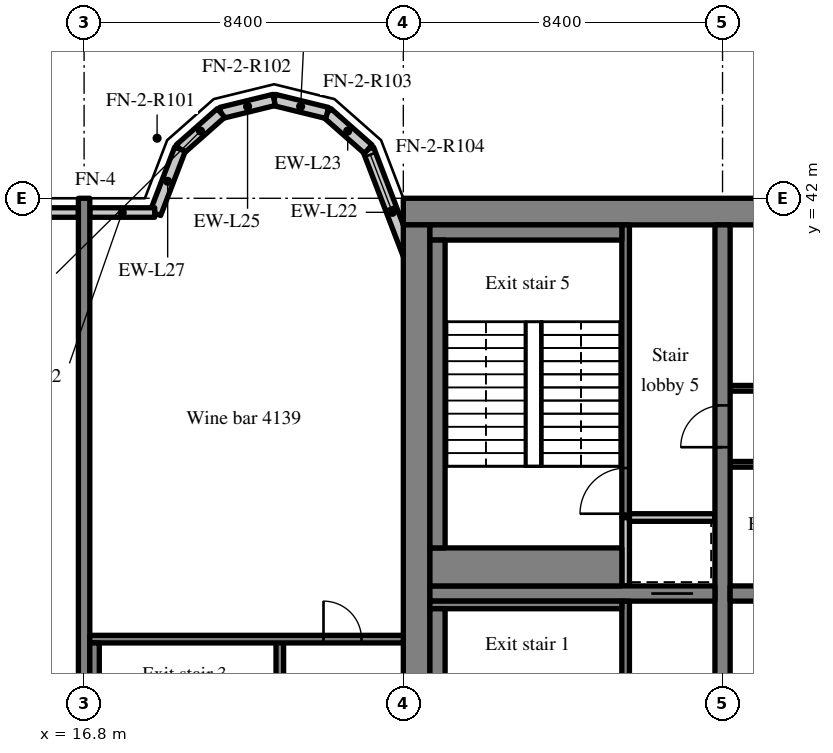
"""IFC4 building model, lengths in metres.
Left out: names, types, materials, properties, quantities, classifications, styles, units other than length and angle.
Written with IfcOpenShell. Run it as: python <this file> out.ifc"""

import sys

from ifc_helpers import new_model, si_unit, direction, frame, frame_2d, origin, place, context, subcontext, project, spatial, rectangle, extrude, source, transform, mapped, element, fill, save


model = new_model("IFC4")
c1 = context("Model", 3, precision=1e-05, world=origin(), true_north=direction((0.0, 1.0)))
c2 = subcontext(c1, "Body", "Model", "MODEL_VIEW")
j1 = project(units=[si_unit("LENGTHUNIT", "METRE"), si_unit("PLANEANGLEUNIT", "RADIAN")], contexts=[c1])
p1 = place(None, origin())
s1 = spatial("IfcSite", under=j1, at=p1, CompositionType="ELEMENT")
p2 = place(p1, origin())
s2 = spatial("IfcBuilding", under=s1, at=p2, CompositionType="ELEMENT")
p3 = place(p2, frame((0.0, 0.0, 170.6)))
s3 = spatial("IfcBuildingStorey", under=s2, at=p3, CompositionType="ELEMENT", Elevation=170.6)
m1 = source(origin(), c2, "Body", "SweptSolid", [
    extrude(rectangle(XDim=50.4, YDim=0.7, at=frame_2d((25.2, 0.0))), origin(), (0.0, 0.0, 1.0), 3.52),
])
p4 = place(p3, frame((25.2, 41.65, 0.0), z_axis=(0.0, 0.0, 1.0), x_axis=(1.0, 0.0, 0.0)))
e1 = element("IfcWall", 1, at=p4, inside=s3, PredefinedType="SHEAR", context=c2, shape_type="MappedRepresentation", body=[
    mapped(m1, transform((0.0, 0.0, 0.0), scale=1.0)),
])
m2 = source(origin(), c2, "Body", "SweptSolid", [
    extrude(rectangle(XDim=18.6, YDim=0.7, at=frame_2d((9.3, 0.0))), origin(), (0.0, 0.0, 1.0), 3.52),
])
p5 = place(p3, frame((25.55, 22.7, 0.0), z_axis=(0.0, 0.0, 1.0), x_axis=(0.0, 1.0, 0.0)))
e2 = element("IfcWall", 2, at=p5, inside=s3, PredefinedType="SHEAR", context=c2, shape_type="MappedRepresentation", body=[
    mapped(m2, transform((0.0, 0.0, 0.0), scale=1.0)),
])
m3 = source(origin(), c2, "Body", "SweptSolid", [
    extrude(rectangle(XDim=18.6, YDim=0.4, at=frame_2d((9.3, 0.0))), origin(), (0.0, 0.0, 1.0), 3.52),
])
p6 = place(p3, frame((33.6, 22.7, 0.0), z_axis=(0.0, 0.0, 1.0), x_axis=(0.0, 1.0, 0.0)))
e3 = element("IfcWall", 3, at=p6, inside=s3, PredefinedType="SHEAR", context=c2, shape_type="MappedRepresentation", body=[
    mapped(m3, transform((0.0, 0.0, 0.0), scale=1.0)),
])
m4 = source(origin(), c2, "Body", "SweptSolid", [
    extrude(rectangle(XDim=1.1, YDim=2.1, at=frame_2d((0.55, 1.05))), frame((0.0, 0.21, 0.0), z_axis=(0.0, -1.0, 0.0), x_axis=(1.0, 0.0, 0.0)), (0.0, 0.0, 1.0), 0.42),
])
p7 = place(p6, frame((12.75, 0.0, 0.0)))
e4 = element("IfcOpeningElement", 4, at=p7, cuts=e3, PredefinedType="OPENING", context=c2, shape_type="MappedRepresentation", body=[
    mapped(m4, transform((0.0, 0.0, 0.0), scale=1.0)),
])
m5 = source(origin(), c2, "Body", "SweptSolid", [
    extrude(rectangle(XDim=7.5, YDim=0.4, at=frame_2d((3.75, 0.0))), origin(), (0.0, 0.0, 1.0), 3.52),
])
p8 = place(p3, frame((25.9, 31.6, 0.0), z_axis=(0.0, 0.0, 1.0), x_axis=(1.0, 0.0, 0.0)))
e5 = element("IfcWall", 5, at=p8, inside=s3, PredefinedType="SHEAR", context=c2, shape_type="MappedRepresentation", body=[
    mapped(m5, transform((0.0, 0.0, 0.0), scale=1.0)),
])
p9 = place(p8, frame((5.825, 0.0, 0.0)))
e6 = element("IfcOpeningElement", 6, at=p9, cuts=e5, PredefinedType="OPENING", context=c2, shape_type="MappedRepresentation", body=[
    mapped(m4, transform((0.0, 0.0, 0.0), scale=1.0)),
])
m6 = source(origin(), c2, "Body", "SweptSolid", [
    extrude(rectangle(XDim=16.4, YDim=0.4, at=frame_2d((8.2, 0.0))), origin(), (0.0, 0.0, 1.0), 3.52),
])
p10 = place(p3, frame((33.8, 31.6, 0.0), z_axis=(0.0, 0.0, 1.0), x_axis=(1.0, 0.0, 0.0)))
e7 = element("IfcWall", 7, at=p10, inside=s3, PredefinedType="SHEAR", context=c2, shape_type="MappedRepresentation", body=[
    mapped(m6, transform((0.0, 0.0, 0.0), scale=1.0)),
])
m7 = source(origin(), c2, "Body", "SweptSolid", [
    extrude(rectangle(XDim=1.0, YDim=2.1, at=frame_2d((0.5, 1.05))), frame((0.0, 0.21, 0.0), z_axis=(0.0, -1.0, 0.0), x_axis=(1.0, 0.0, 0.0)), (0.0, 0.0, 1.0), 0.42),
])
p11 = place(p10, frame((14.8, 0.0, 0.0)))
e8 = element("IfcOpeningElement", 8, at=p11, cuts=e7, PredefinedType="OPENING", context=c2, shape_type="MappedRepresentation", body=[
    mapped(m7, transform((0.0, 0.0, 0.0), scale=1.0)),
])
m8 = source(origin(), c2, "Body", "SweptSolid", [
    extrude(rectangle(XDim=20.0, YDim=0.3, at=frame_2d((10.0, 0.0))), origin(), (0.0, 0.0, 1.0), 3.52),
])
p12 = place(p3, frame((16.8, 22.0, 0.0), z_axis=(0.0, 0.0, 1.0), x_axis=(0.0, 1.0, 0.0)))
e9 = element("IfcWall", 9, at=p12, inside=s3, PredefinedType="SHEAR", context=c2, shape_type="MappedRepresentation", body=[
    mapped(m8, transform((0.0, 0.0, 0.0), scale=1.0)),
])
m9 = source(origin(), c2, "Body", "SweptSolid", [
    extrude(rectangle(XDim=3.559, YDim=0.3, at=frame_2d((1.78, 0.0))), origin(), (0.0, 0.0, 1.0), 3.52),
])
p13 = place(p3, frame((25.55, 39.969, 0.0), z_axis=(0.0, 0.0, 1.0), x_axis=(-0.35779745313, 0.933799219604, 0.0)))
e10 = element("IfcWall", 10, at=p13, inside=s3, PredefinedType="SOLIDWALL", context=c2, shape_type="MappedRepresentation", body=[
    mapped(m9, transform((0.0, 0.0, 0.0), scale=1.0)),
])
m10 = source(origin(), c2, "Body", "SweptSolid", [
    extrude(rectangle(XDim=1.5, YDim=2.0, at=frame_2d((0.75, 1.0))), frame((0.0, 0.16, 0.0), z_axis=(0.0, -1.0, 0.0), x_axis=(1.0, 0.0, 0.0)), (0.0, 0.0, 1.0), 0.32),
])
p14 = place(p13, frame((1.903, 0.0, 0.9)))
e11 = element("IfcOpeningElement", 11, at=p14, cuts=e10, PredefinedType="OPENING", context=c2, shape_type="MappedRepresentation", body=[
    mapped(m10, transform((0.0, 0.0, 0.0), scale=1.0)),
])
m11 = source(origin(), c2, "Body", "SweptSolid", [
    extrude(rectangle(XDim=1.44, YDim=0.3, at=frame_2d((0.72, 0.0))), origin(), (0.0, 0.0, 1.0), 3.52),
])
p15 = place(p3, frame((24.277, 43.292, 0.0), z_axis=(0.0, 0.0, 1.0), x_axis=(-0.749649827867, 0.661834673902, 0.0)))
e12 = element("IfcWall", 12, at=p15, inside=s3, PredefinedType="SOLIDWALL", context=c2, shape_type="MappedRepresentation", body=[
    mapped(m11, transform((0.0, 0.0, 0.0), scale=1.0)),
])
m12 = source(origin(), c2, "Body", "SweptSolid", [
    extrude(rectangle(XDim=1.438, YDim=0.3, at=frame_2d((0.719, 0.0))), origin(), (0.0, 0.0, 1.0), 3.52),
])
p16 = place(p3, frame((23.197, 44.245, 0.0), z_axis=(0.0, 0.0, 1.0), x_axis=(-0.971152283879, 0.238460146601, 0.0)))
e13 = element("IfcWall", 13, at=p16, inside=s3, PredefinedType="SOLIDWALL", context=c2, shape_type="MappedRepresentation", body=[
    mapped(m12, transform((0.0, 0.0, 0.0), scale=1.0)),
])
m13 = source(origin(), c2, "Body", "SweptSolid", [
    extrude(rectangle(XDim=1.439, YDim=0.3, at=frame_2d((0.719, 0.0))), origin(), (0.0, 0.0, 1.0), 3.52),
])
p17 = place(p3, frame((21.8, 44.588, 0.0), z_axis=(0.0, 0.0, 1.0), x_axis=(-0.971161932466, -0.238420848351, 0.0)))
e14 = element("IfcWall", 14, at=p17, inside=s3, PredefinedType="SOLIDWALL", context=c2, shape_type="MappedRepresentation", body=[
    mapped(m13, transform((0.0, 0.0, 0.0), scale=1.0)),
])
m14 = source(origin(), c2, "Body", "SweptSolid", [
    extrude(rectangle(XDim=1.44, YDim=0.3, at=frame_2d((0.72, 0.0))), origin(), (0.0, 0.0, 1.0), 3.52),
])
p18 = place(p3, frame((20.403, 44.245, 0.0), z_axis=(0.0, 0.0, 1.0), x_axis=(-0.74957555648, -0.661918790432, 0.0)))
e15 = element("IfcWall", 15, at=p18, inside=s3, PredefinedType="SOLIDWALL", context=c2, shape_type="MappedRepresentation", body=[
    mapped(m14, transform((0.0, 0.0, 0.0), scale=1.0)),
])
m15 = source(origin(), c2, "Body", "SweptSolid", [
    extrude(rectangle(XDim=1.812, YDim=0.3, at=frame_2d((0.906, 0.0))), origin(), (0.0, 0.0, 1.0), 3.52),
])
p19 = place(p3, frame((19.323, 43.292, 0.0), z_axis=(0.0, 0.0, 1.0), x_axis=(-0.357877270961, -0.93376863244, 0.0)))
e16 = element("IfcWall", 16, at=p19, inside=s3, PredefinedType="SOLIDWALL", context=c2, shape_type="MappedRepresentation", body=[
    mapped(m15, transform((0.0, 0.0, 0.0), scale=1.0)),
])
m16 = source(origin(), c2, "Body", "SweptSolid", [
    extrude(rectangle(XDim=4.094, YDim=0.25, at=frame_2d((2.047, 0.0))), origin(), (0.0, 0.0, 1.0), 2.87),
])
p20 = place(p3, frame((16.65, 41.625, 0.0), z_axis=(0.0, 0.0, 1.0), x_axis=(-1.0, 0.0, 0.0)))
e17 = element("IfcWall", 17, at=p20, inside=s3, PredefinedType="SOLIDWALL", context=c2, shape_type="MappedRepresentation", body=[
    mapped(m16, transform((0.0, 0.0, 0.0), scale=1.0)),
])
m17 = source(origin(), c2, "Body", "SweptSolid", [
    extrude(rectangle(XDim=1.5, YDim=1.5, at=frame_2d((0.75, 0.75))), frame((0.0, 0.135, 0.0), z_axis=(0.0, -1.0, 0.0), x_axis=(1.0, 0.0, 0.0)), (0.0, 0.0, 1.0), 0.27),
])
p21 = place(p20, frame((1.297, 0.0, 0.9)))
e18 = element("IfcOpeningElement", 18, at=p21, cuts=e17, PredefinedType="OPENING", context=c2, shape_type="MappedRepresentation", body=[
    mapped(m17, transform((0.0, 0.0, 0.0), scale=1.0)),
])
m18 = source(origin(), c2, "Body", "SweptSolid", [
    extrude(rectangle(XDim=1.708, YDim=0.25, at=frame_2d((0.854, 0.0))), origin(), (0.0, 0.0, 1.0), 2.87),
])
p22 = place(p3, frame((18.658, 41.625, 0.0), z_axis=(0.0, 0.0, 1.0), x_axis=(-1.0, 0.0, 0.0)))
e19 = element("IfcWall", 19, at=p22, inside=s3, PredefinedType="SOLIDWALL", context=c2, shape_type="MappedRepresentation", body=[
    mapped(m18, transform((0.0, 0.0, 0.0), scale=1.0)),
])
m19 = source(origin(), c2, "Body", "SweptSolid", [
    extrude(rectangle(XDim=14.2, YDim=0.15, at=frame_2d((7.1, 0.0))), origin(), (0.0, 0.0, 1.0), 3.52),
])
p23 = place(p3, frame((33.8, 35.0, 0.0), z_axis=(0.0, 0.0, 1.0), x_axis=(1.0, 0.0, 0.0)))
e20 = element("IfcWall", 20, at=p23, inside=s3, PredefinedType="PARTITIONING", context=c2, shape_type="MappedRepresentation", body=[
    mapped(m19, transform((0.0, 0.0, 0.0), scale=1.0)),
])
m20 = source(origin(), c2, "Body", "SweptSolid", [
    extrude(rectangle(XDim=0.9, YDim=2.1, at=frame_2d((0.45, 1.05))), frame((0.0, 0.085, 0.0), z_axis=(0.0, -1.0, 0.0), x_axis=(1.0, 0.0, 0.0)), (0.0, 0.0, 1.0), 0.17),
])
p24 = place(p23, frame((2.022, 0.0, 0.0)))
e21 = element("IfcOpeningElement", 21, at=p24, cuts=e20, PredefinedType="OPENING", context=c2, shape_type="MappedRepresentation", body=[
    mapped(m20, transform((0.0, 0.0, 0.0), scale=1.0)),
])
p25 = place(p23, frame((9.084, 0.0, 0.0)))
e22 = element("IfcOpeningElement", 22, at=p25, cuts=e20, PredefinedType="OPENING", context=c2, shape_type="MappedRepresentation", body=[
    mapped(m20, transform((0.0, 0.0, 0.0), scale=1.0)),
])
m21 = source(origin(), c2, "Body", "SweptSolid", [
    extrude(rectangle(XDim=16.4, YDim=0.15, at=frame_2d((8.2, 0.0))), origin(), (0.0, 0.0, 1.0), 3.52),
])
p26 = place(p3, frame((33.8, 37.0, 0.0), z_axis=(0.0, 0.0, 1.0), x_axis=(1.0, 0.0, 0.0)))
e23 = element("IfcWall", 23, at=p26, inside=s3, PredefinedType="PARTITIONING", context=c2, shape_type="MappedRepresentation", body=[
    mapped(m21, transform((0.0, 0.0, 0.0), scale=1.0)),
])
p27 = place(p26, frame((3.24, 0.0, 0.0)))
e24 = element("IfcOpeningElement", 24, at=p27, cuts=e23, PredefinedType="OPENING", context=c2, shape_type="MappedRepresentation", body=[
    mapped(m20, transform((0.0, 0.0, 0.0), scale=1.0)),
])
p28 = place(p26, frame((8.16, 0.0, 0.0)))
e25 = element("IfcOpeningElement", 25, at=p28, cuts=e23, PredefinedType="OPENING", context=c2, shape_type="MappedRepresentation", body=[
    mapped(m20, transform((0.0, 0.0, 0.0), scale=1.0)),
])
p29 = place(p26, frame((11.44, 0.0, 0.0)))
e26 = element("IfcOpeningElement", 26, at=p29, cuts=e23, PredefinedType="OPENING", context=c2, shape_type="MappedRepresentation", body=[
    mapped(m20, transform((0.0, 0.0, 0.0), scale=1.0)),
])
p30 = place(p26, frame((14.72, 0.0, 0.0)))
e27 = element("IfcOpeningElement", 27, at=p30, cuts=e23, PredefinedType="OPENING", context=c2, shape_type="MappedRepresentation", body=[
    mapped(m20, transform((0.0, 0.0, 0.0), scale=1.0)),
])
m22 = source(origin(), c2, "Body", "SweptSolid", [
    extrude(rectangle(XDim=8.7, YDim=0.2, at=frame_2d((4.35, 0.0))), origin(), (0.0, 0.0, 1.0), 3.52),
])
p31 = place(p3, frame((31.05, 22.7, 0.0), z_axis=(0.0, 0.0, 1.0), x_axis=(0.0, 1.0, 0.0)))
e28 = element("IfcWall", 28, at=p31, inside=s3, PredefinedType="SOLIDWALL", context=c2, shape_type="MappedRepresentation", body=[
    mapped(m22, transform((0.0, 0.0, 0.0), scale=1.0)),
])
m23 = source(origin(), c2, "Body", "SweptSolid", [
    extrude(rectangle(XDim=1.2, YDim=2.1, at=frame_2d((0.6, 1.05))), frame((0.0, 0.11, 0.0), z_axis=(0.0, -1.0, 0.0), x_axis=(1.0, 0.0, 0.0)), (0.0, 0.0, 1.0), 0.22),
])
p32 = place(p31, frame((0.9, 0.0, 0.0)))
e29 = element("IfcOpeningElement", 29, at=p32, cuts=e28, PredefinedType="OPENING", context=c2, shape_type="MappedRepresentation", body=[
    mapped(m23, transform((0.0, 0.0, 0.0), scale=1.0)),
])
m24 = source(origin(), c2, "Body", "SweptSolid", [
    extrude(rectangle(XDim=1.8, YDim=0.2, at=frame_2d((0.9, 0.0))), origin(), (0.0, 0.0, 1.0), 3.52),
])
p33 = place(p3, frame((31.05, 31.8, 0.0), z_axis=(0.0, 0.0, 1.0), x_axis=(0.0, 1.0, 0.0)))
e30 = element("IfcWall", 30, at=p33, inside=s3, PredefinedType="SOLIDWALL", context=c2, shape_type="MappedRepresentation", body=[
    mapped(m24, transform((0.0, 0.0, 0.0), scale=1.0)),
])
m25 = source(origin(), c2, "Body", "SweptSolid", [
    extrude(rectangle(XDim=2.25, YDim=0.2, at=frame_2d((1.125, 0.0))), origin(), (0.0, 0.0, 1.0), 3.52),
])
p34 = place(p3, frame((31.15, 33.6, 0.0), z_axis=(0.0, 0.0, 1.0), x_axis=(1.0, 0.0, 0.0)))
e31 = element("IfcWall", 31, at=p34, inside=s3, PredefinedType="SOLIDWALL", context=c2, shape_type="MappedRepresentation", body=[
    mapped(m25, transform((0.0, 0.0, 0.0), scale=1.0)),
])
m26 = source(origin(), c2, "Body", "SweptSolid", [
    extrude(rectangle(XDim=7.7, YDim=0.2, at=frame_2d((3.85, 0.0))), origin(), (0.0, 0.0, 1.0), 3.52),
])
p35 = place(p3, frame((31.05, 33.6, 0.0), z_axis=(0.0, 0.0, 1.0), x_axis=(0.0, 1.0, 0.0)))
e32 = element("IfcWall", 32, at=p35, inside=s3, PredefinedType="SOLIDWALL", context=c2, shape_type="MappedRepresentation", body=[
    mapped(m26, transform((0.0, 0.0, 0.0), scale=1.0)),
])
p36 = place(p35, frame((0.1, 0.0, 0.0)))
e33 = element("IfcOpeningElement", 33, at=p36, cuts=e32, PredefinedType="OPENING", context=c2, shape_type="MappedRepresentation", body=[
    mapped(m23, transform((0.0, 0.0, 0.0), scale=1.0)),
])
m27 = source(origin(), c2, "Body", "SweptSolid", [
    extrude(rectangle(XDim=8.3, YDim=0.2, at=frame_2d((4.15, 0.0))), origin(), (0.0, 0.0, 1.0), 3.52),
])
p37 = place(p3, frame((21.95, 22.1, 0.0), z_axis=(0.0, 0.0, 1.0), x_axis=(0.0, 1.0, 0.0)))
e34 = element("IfcWall", 34, at=p37, inside=s3, PredefinedType="SOLIDWALL", context=c2, shape_type="MappedRepresentation", body=[
    mapped(m27, transform((0.0, 0.0, 0.0), scale=1.0)),
])
p38 = place(p37, frame((0.6, 0.0, 0.0)))
e35 = element("IfcOpeningElement", 35, at=p38, cuts=e34, PredefinedType="OPENING", context=c2, shape_type="MappedRepresentation", body=[
    mapped(m23, transform((0.0, 0.0, 0.0), scale=1.0)),
])
m28 = source(origin(), c2, "Body", "SweptSolid", [
    extrude(rectangle(XDim=8.25, YDim=0.2, at=frame_2d((4.125, 0.0))), origin(), (0.0, 0.0, 1.0), 3.52),
])
p39 = place(p3, frame((16.95, 30.4, 0.0), z_axis=(0.0, 0.0, 1.0), x_axis=(1.0, 0.0, 0.0)))
e36 = element("IfcWall", 36, at=p39, inside=s3, PredefinedType="SOLIDWALL", context=c2, shape_type="MappedRepresentation", body=[
    mapped(m28, transform((0.0, 0.0, 0.0), scale=1.0)),
])
m29 = source(origin(), c2, "Body", "SweptSolid", [
    extrude(rectangle(XDim=1.0, YDim=2.1, at=frame_2d((0.5, 1.05))), frame((0.0, 0.11, 0.0), z_axis=(0.0, -1.0, 0.0), x_axis=(1.0, 0.0, 0.0)), (0.0, 0.0, 1.0), 0.22),
])
p40 = place(p39, frame((6.15, 0.0, 0.0)))
e37 = element("IfcOpeningElement", 37, at=p40, cuts=e36, PredefinedType="OPENING", context=c2, shape_type="MappedRepresentation", body=[
    mapped(m29, transform((0.0, 0.0, 0.0), scale=1.0)),
])
m30 = source(origin(), c2, "Body", "SweptSolid", [
    extrude(rectangle(XDim=5.05, YDim=0.2, at=frame_2d((2.525, 0.0))), origin(), (0.0, 0.0, 1.0), 3.52),
])
p41 = place(p3, frame((25.9, 31.3, 0.0), z_axis=(0.0, 0.0, 1.0), x_axis=(1.0, 0.0, 0.0)))
e38 = element("IfcWall", 38, at=p41, inside=s3, PredefinedType="SOLIDWALL", context=c2, shape_type="MappedRepresentation", body=[
    mapped(m30, transform((0.0, 0.0, 0.0), scale=1.0)),
])
m31 = source(origin(), c2, "Body", "SweptSolid", [
    extrude(rectangle(XDim=8.1, YDim=0.4, at=frame_2d((4.05, 0.0))), origin(), (0.0, 0.0, 1.0), 3.52),
])
p42 = place(p3, frame((26.1, 23.1, 0.0), z_axis=(0.0, 0.0, 1.0), x_axis=(0.0, 1.0, 0.0)))
e39 = element("IfcWall", 39, at=p42, inside=s3, PredefinedType="SOLIDWALL", context=c2, shape_type="MappedRepresentation", body=[
    mapped(m31, transform((0.0, 0.0, 0.0), scale=1.0)),
])
m32 = source(origin(), c2, "Body", "SweptSolid", [
    extrude(rectangle(XDim=8.1, YDim=0.25, at=frame_2d((4.05, 0.0))), origin(), (0.0, 0.0, 1.0), 3.52),
])
p43 = place(p3, frame((17.075, 22.2, 0.0), z_axis=(0.0, 0.0, 1.0), x_axis=(0.0, 1.0, 0.0)))
e40 = element("IfcWall", 40, at=p43, inside=s3, PredefinedType="SOLIDWALL", context=c2, shape_type="MappedRepresentation", body=[
    mapped(m32, transform((0.0, 0.0, 0.0), scale=1.0)),
])
m33 = source(origin(), c2, "Body", "SweptSolid", [
    extrude(rectangle(XDim=5.05, YDim=0.4, at=frame_2d((2.525, 0.0))), origin(), (0.0, 0.0, 1.0), 3.52),
])
p44 = place(p3, frame((25.9, 41.1, 0.0), z_axis=(0.0, 0.0, 1.0), x_axis=(1.0, 0.0, 0.0)))
e41 = element("IfcWall", 41, at=p44, inside=s3, PredefinedType="SOLIDWALL", context=c2, shape_type="MappedRepresentation", body=[
    mapped(m33, transform((0.0, 0.0, 0.0), scale=1.0)),
])
m34 = source(origin(), c2, "Body", "SweptSolid", [
    extrude(rectangle(XDim=5.05, YDim=1.0, at=frame_2d((2.525, 0.0))), origin(), (0.0, 0.0, 1.0), 3.52),
])
p45 = place(p3, frame((25.9, 32.3, 0.0), z_axis=(0.0, 0.0, 1.0), x_axis=(1.0, 0.0, 0.0)))
e42 = element("IfcWall", 42, at=p45, inside=s3, PredefinedType="SOLIDWALL", context=c2, shape_type="MappedRepresentation", body=[
    mapped(m34, transform((0.0, 0.0, 0.0), scale=1.0)),
])
p46 = place(p3, frame((26.1, 32.8, 0.0), z_axis=(0.0, 0.0, 1.0), x_axis=(0.0, 1.0, 0.0)))
e43 = element("IfcWall", 43, at=p46, inside=s3, PredefinedType="SOLIDWALL", context=c2, shape_type="MappedRepresentation", body=[
    mapped(m31, transform((0.0, 0.0, 0.0), scale=1.0)),
])
m35 = source(origin(), c2, "Body", "SweptSolid", [
    extrude(rectangle(XDim=1.5, YDim=2.0, at=frame_2d((0.75, 1.0))), frame((0.0, 0.03, 0.0), z_axis=(0.0, -1.0, 0.0), x_axis=(1.0, 0.0, 0.0)), (0.0, 0.0, 1.0), 0.06),
])
p47 = place(p14, origin())
e44 = element("IfcWindow", 44, at=p47, inside=s3, PartitioningType="SINGLE_PANEL", PredefinedType="WINDOW", context=c2, shape_type="MappedRepresentation", body=[
    mapped(m35, transform((0.0, 0.0, 0.0), scale=1.0)),
])
fill(e11, e44)
m36 = source(origin(), c2, "Body", "SweptSolid", [
    extrude(rectangle(XDim=1.1, YDim=2.1, at=frame_2d((0.55, 1.05))), frame((0.0, 0.025, 0.0), z_axis=(0.0, -1.0, 0.0), x_axis=(1.0, 0.0, 0.0)), (0.0, 0.0, 1.0), 0.05),
])
p48 = place(p9, origin())
e45 = element("IfcDoor", 45, at=p48, inside=s3, OperationType="SLIDING_TO_LEFT", PredefinedType="DOOR", context=c2, shape_type="MappedRepresentation", body=[
    mapped(m36, transform((0.0, 0.0, 0.0), scale=1.0)),
])
fill(e6, e45)
m37 = source(origin(), c2, "Body", "SweptSolid", [
    extrude(rectangle(XDim=1.2, YDim=2.1, at=frame_2d((0.6, 1.05))), frame((0.0, 0.025, 0.0), z_axis=(0.0, -1.0, 0.0), x_axis=(1.0, 0.0, 0.0)), (0.0, 0.0, 1.0), 0.05),
])
p49 = place(p36, origin())
e46 = element("IfcDoor", 46, at=p49, inside=s3, OperationType="SINGLE_SWING_LEFT", PredefinedType="DOOR", context=c2, shape_type="MappedRepresentation", body=[
    mapped(m37, transform((0.0, 0.0, 0.0), scale=1.0)),
])
fill(e33, e46)
m38 = source(origin(), c2, "Body", "SweptSolid", [
    extrude(rectangle(XDim=1.0, YDim=2.1, at=frame_2d((0.5, 1.05))), frame((0.0, 0.025, 0.0), z_axis=(0.0, -1.0, 0.0), x_axis=(1.0, 0.0, 0.0)), (0.0, 0.0, 1.0), 0.05),
])
p50 = place(p40, origin())
e47 = element("IfcDoor", 47, at=p50, inside=s3, OperationType="SINGLE_SWING_LEFT", PredefinedType="DOOR", context=c2, shape_type="MappedRepresentation", body=[
    mapped(m38, transform((0.0, 0.0, 0.0), scale=1.0)),
])
fill(e37, e47)
p51 = place(p7, origin())
e48 = element("IfcDoor", 48, at=p51, inside=s3, OperationType="SINGLE_SWING_LEFT", PredefinedType="DOOR", context=c2, shape_type="MappedRepresentation", body=[
    mapped(m36, transform((0.0, 0.0, 0.0), scale=1.0)),
])
fill(e4, e48)
save(model, sys.argv[1])
